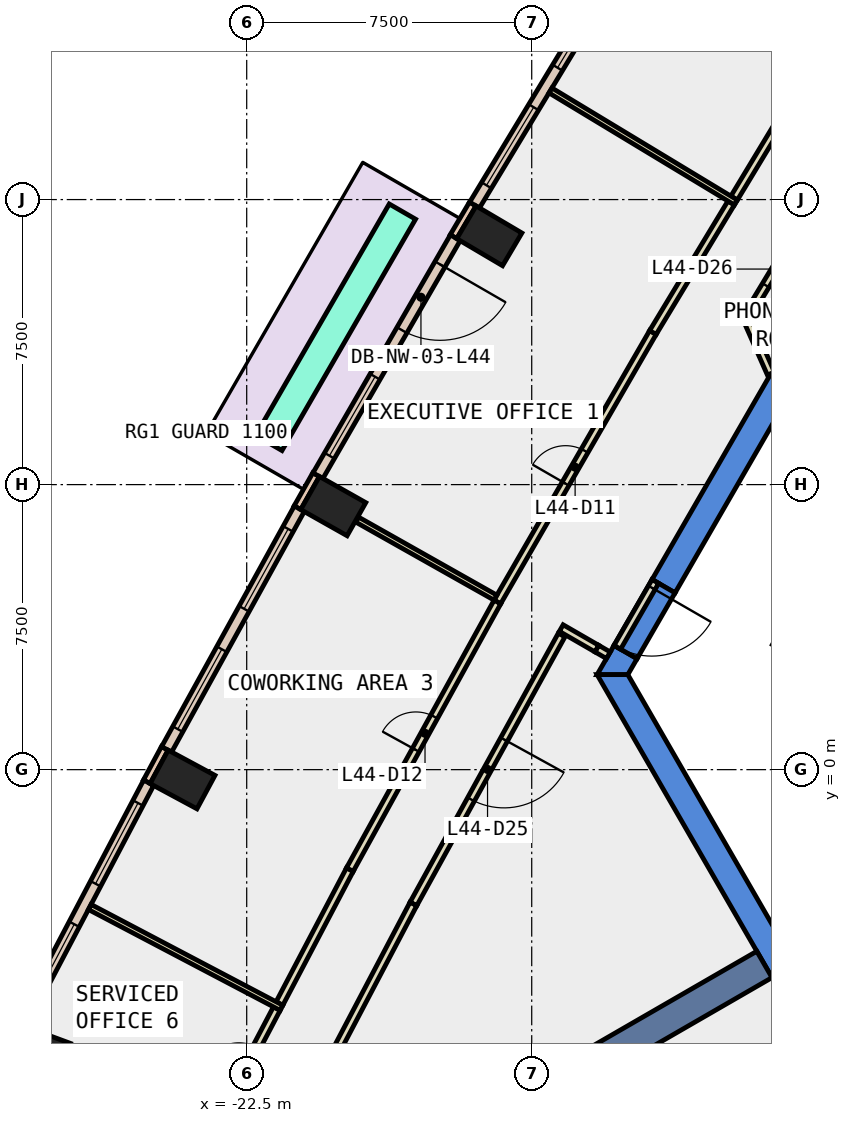
"""IFC4 building model, lengths in metres.
Left out: names, types, materials, properties, quantities, classifications, styles, units other than length and angle.
Written with IfcOpenShell. Run it as: python <this file> out.ifc"""

import sys

from ifc_helpers import new_model, si_unit, direction, frame, frame_2d, origin, origin_2d, place, context, subcontext, project, spatial, polyline, rectangle, outline, extrude, element, fill, save


model = new_model("IFC4")
c1 = context("Model", 3, precision=1e-05, world=origin(), true_north=direction((0.0, 1.0)))
c2 = subcontext(c1, "Body", "Model", "MODEL_VIEW")
j1 = project(units=[si_unit("LENGTHUNIT", "METRE"), si_unit("PLANEANGLEUNIT", "RADIAN")], contexts=[c1])
p1 = place(None, origin())
s1 = spatial("IfcSite", under=j1, at=p1, CompositionType="ELEMENT")
p2 = place(p1, origin())
s2 = spatial("IfcBuilding", under=s1, at=p2, CompositionType="ELEMENT")
p3 = place(p2, frame((0.0, 0.0, 198.2)))
s3 = spatial("IfcBuildingStorey", under=s2, at=p3, CompositionType="ELEMENT", Elevation=198.2)
for number, where, z_axis, x_axis in (
    (1, (-16.116, 14.046, -0.4), (0.0, 0.0, 1.0), (0.509, 0.861, 0.0)),
    (2, (-20.222, 6.934, -0.4), (0.0, 0.0, 1.0), (0.491, 0.871, 0.0)),
    (3, (-24.188, -0.259, -0.4), (0.0, 0.0, 1.0), (0.474, 0.88, 0.0)),
    (4, (-27.967, -7.429, -0.4), (0.0, 0.0, 1.0), (0.347, 0.938, 0.0)),
):
    element("IfcColumn", number, at=place(p3, frame(where, z_axis=z_axis, x_axis=x_axis)), inside=s3, PredefinedType="COLUMN", context=c2, shape_type="SweptSolid", body=[
        extrude(rectangle(XDim=1.0, YDim=1.4, at=origin_2d()), origin(), (0.0, 0.0, 1.0), 4.2),
    ])
p4 = place(p3, frame((0.0, 0.0, -0.4)))
e5 = element("IfcWall", 5, at=p4, inside=s3, PredefinedType="SHEAR", context=c2, shape_type="SweptSolid", body=[
    extrude(outline(polyline([(-11.834, 5.002), (-11.228, 4.652), (-6.235, 13.3), (-6.64, 14.0), (-11.834, 5.002)])), origin(), (0.0, 0.0, 1.0), 4.2),
])
p5 = place(p3, frame((0.0, 0.0, -0.4)))
e6 = element("IfcWall", 6, at=p5, inside=s3, PredefinedType="SHEAR", context=c2, shape_type="SweptSolid", body=[
    extrude(outline(polyline([(-12.228, 2.92), (-12.834, 3.27), (-13.279, 2.5), (-12.471, 2.5), (-12.228, 2.92)])), origin(), (0.0, 0.0, 1.0), 4.2),
])
p6 = place(p3, frame((0.0, 0.0, 3.6)))
e7 = element("IfcWall", 7, at=p6, inside=s3, PredefinedType="SHEAR", context=c2, shape_type="SweptSolid", body=[
    extrude(outline(polyline([(-12.834, 3.27), (-12.228, 2.92), (-11.228, 4.652), (-11.834, 5.002), (-12.834, 3.27)])), origin(), (0.0, 0.0, 1.0), 0.2),
])
p7 = place(p3, frame((0.0, 0.0, -0.4)))
e8 = element("IfcWall", 8, at=p7, inside=s3, PredefinedType="SHEAR", context=c2, shape_type="SweptSolid", body=[
    extrude(outline(polyline([(-13.279, 2.5), (-6.64, -9.0), (-6.235, -8.3), (-12.471, 2.5), (-13.279, 2.5)])), origin(), (0.0, 0.0, 1.0), 4.2),
])
p8 = place(p3, frame((-8.877, -5.125, -0.4), z_axis=(0.0, 0.0, 1.0), x_axis=(-0.866017533419, -0.500013631625, 0.0)))
e9 = element("IfcWall", 9, at=p8, inside=s3, PredefinedType="SHEAR", context=c2, shape_type="SweptSolid", body=[
    extrude(rectangle(XDim=9.0, YDim=0.8, at=frame_2d((4.5, 0.0))), origin(), (0.0, 0.0, 1.0), 4.2),
])
p9 = place(p3, frame((-16.551, 14.884, 0.0), z_axis=(0.0, 0.0, 1.0), x_axis=(-0.508161541526, -0.861261776531, 0.0)))
e10 = element("IfcWall", 10, at=p9, inside=s3, PredefinedType="STANDARD", context=c2, shape_type="SweptSolid", body=[
    extrude(rectangle(XDim=1.0, YDim=0.2, at=frame_2d((0.5, 0.0))), origin(), (0.0, 0.0, 1.0), 3.8),
])
p10 = place(p3, frame((-20.673, 7.762, 0.0), z_axis=(0.0, 0.0, 1.0), x_axis=(-0.491848119507, -0.870681013539, 0.0)))
e11 = element("IfcWall", 11, at=p10, inside=s3, PredefinedType="STANDARD", context=c2, shape_type="SweptSolid", body=[
    extrude(rectangle(XDim=1.0, YDim=0.2, at=frame_2d((0.5, 0.0))), origin(), (0.0, 0.0, 1.0), 3.8),
])
p11 = place(p3, frame((-24.655, 0.561, 0.0), z_axis=(0.0, 0.0, 1.0), x_axis=(-0.473663196434, -0.88070606694, 0.0)))
e12 = element("IfcWall", 12, at=p11, inside=s3, PredefinedType="STANDARD", context=c2, shape_type="SweptSolid", body=[
    extrude(rectangle(XDim=1.0, YDim=0.2, at=frame_2d((0.5, 0.0))), origin(), (0.0, 0.0, 1.0), 3.8),
])
p12 = place(p3, frame((-12.765, 21.043, 0.0), z_axis=(0.0, 0.0, 1.0), x_axis=(-0.517159962006, -0.855888762456, 0.0)))
e13 = element("IfcWall", 13, at=p12, inside=s3, PredefinedType="STANDARD", context=c2, shape_type="SweptSolid", body=[
    extrude(rectangle(XDim=7.23, YDim=0.3, at=frame_2d((3.615, 0.0))), origin(), (0.0, 0.0, 1.0), 3.8),
])
p13 = place(p12, frame((0.607, 0.0, 0.9)))
e14 = element("IfcOpeningElement", 14, at=p13, cuts=e13, PredefinedType="OPENING", context=c2, shape_type="SweptSolid", body=[
    extrude(rectangle(XDim=2.4, YDim=2.6, at=frame_2d((1.2, 1.3))), frame((0.0, 0.16, 0.0), z_axis=(0.0, -1.0, 0.0), x_axis=(1.0, 0.0, 0.0)), (0.0, 0.0, 1.0), 0.32),
])
p14 = place(p12, frame((4.222, 0.0, 0.9)))
e15 = element("IfcOpeningElement", 15, at=p14, cuts=e13, PredefinedType="OPENING", context=c2, shape_type="SweptSolid", body=[
    extrude(rectangle(XDim=2.4, YDim=2.6, at=frame_2d((1.2, 1.3))), frame((0.0, 0.16, 0.0), z_axis=(0.0, -1.0, 0.0), x_axis=(1.0, 0.0, 0.0)), (0.0, 0.0, 1.0), 0.32),
])
p15 = place(p3, frame((-17.011, 13.996, 0.0), z_axis=(0.0, 0.0, 1.0), x_axis=(-0.499948481376, -0.866055146033, 0.0)))
e16 = element("IfcWall", 16, at=p15, inside=s3, PredefinedType="STANDARD", context=c2, shape_type="SweptSolid", body=[
    extrude(rectangle(XDim=7.231, YDim=0.3, at=frame_2d((3.615, 0.0))), origin(), (0.0, 0.0, 1.0), 3.8),
])
p16 = place(p15, frame((0.808, 0.0, 0.0)))
e17 = element("IfcOpeningElement", 17, at=p16, cuts=e16, PredefinedType="OPENING", context=c2, shape_type="SweptSolid", body=[
    extrude(rectangle(XDim=2.0, YDim=2.4, at=frame_2d((1.0, 1.2))), frame((0.0, 0.16, 0.0), z_axis=(0.0, -1.0, 0.0), x_axis=(1.0, 0.0, 0.0)), (0.0, 0.0, 1.0), 0.32),
])
p17 = place(p15, frame((4.223, 0.0, 0.9)))
e18 = element("IfcOpeningElement", 18, at=p17, cuts=e16, PredefinedType="OPENING", context=c2, shape_type="SweptSolid", body=[
    extrude(rectangle(XDim=2.4, YDim=2.6, at=frame_2d((1.2, 1.3))), frame((0.0, 0.16, 0.0), z_axis=(0.0, -1.0, 0.0), x_axis=(1.0, 0.0, 0.0)), (0.0, 0.0, 1.0), 0.32),
])
p18 = place(p3, frame((-21.116, 6.865, 0.0), z_axis=(0.0, 0.0, 1.0), x_axis=(-0.482862185961, -0.875696356832, 0.0)))
e19 = element("IfcWall", 19, at=p18, inside=s3, PredefinedType="STANDARD", context=c2, shape_type="SweptSolid", body=[
    extrude(rectangle(XDim=7.23, YDim=0.3, at=frame_2d((3.615, 0.0))), origin(), (0.0, 0.0, 1.0), 3.8),
])
p19 = place(p18, frame((0.607, 0.0, 0.9)))
e20 = element("IfcOpeningElement", 20, at=p19, cuts=e19, PredefinedType="OPENING", context=c2, shape_type="SweptSolid", body=[
    extrude(rectangle(XDim=2.4, YDim=2.6, at=frame_2d((1.2, 1.3))), frame((0.0, 0.16, 0.0), z_axis=(0.0, -1.0, 0.0), x_axis=(1.0, 0.0, 0.0)), (0.0, 0.0, 1.0), 0.32),
])
p20 = place(p18, frame((4.222, 0.0, 0.9)))
e21 = element("IfcOpeningElement", 21, at=p20, cuts=e19, PredefinedType="OPENING", context=c2, shape_type="SweptSolid", body=[
    extrude(rectangle(XDim=2.4, YDim=2.6, at=frame_2d((1.2, 1.3))), frame((0.0, 0.16, 0.0), z_axis=(0.0, -1.0, 0.0), x_axis=(1.0, 0.0, 0.0)), (0.0, 0.0, 1.0), 0.32),
])
p21 = place(p3, frame((-25.08, -0.345, 0.0), z_axis=(0.0, 0.0, 1.0), x_axis=(-0.465478369088, -0.885059256723, 0.0)))
e22 = element("IfcWall", 22, at=p21, inside=s3, PredefinedType="STANDARD", context=c2, shape_type="SweptSolid", body=[
    extrude(rectangle(XDim=7.208, YDim=0.3, at=frame_2d((3.604, 0.0))), origin(), (0.0, 0.0, 1.0), 3.8),
])
p22 = place(p21, frame((0.602, 0.0, 0.9)))
e23 = element("IfcOpeningElement", 23, at=p22, cuts=e22, PredefinedType="OPENING", context=c2, shape_type="SweptSolid", body=[
    extrude(rectangle(XDim=2.4, YDim=2.6, at=frame_2d((1.2, 1.3))), frame((0.0, 0.16, 0.0), z_axis=(0.0, -1.0, 0.0), x_axis=(1.0, 0.0, 0.0)), (0.0, 0.0, 1.0), 0.32),
])
p23 = place(p21, frame((4.206, 0.0, 0.9)))
e24 = element("IfcOpeningElement", 24, at=p23, cuts=e22, PredefinedType="OPENING", context=c2, shape_type="SweptSolid", body=[
    extrude(rectangle(XDim=2.4, YDim=2.6, at=frame_2d((1.2, 1.3))), frame((0.0, 0.16, 0.0), z_axis=(0.0, -1.0, 0.0), x_axis=(1.0, 0.0, 0.0)), (0.0, 0.0, 1.0), 0.32),
])
p24 = place(p3, frame((-18.403, 14.684, 0.0), z_axis=(0.0, 0.0, 1.0), x_axis=(-0.499990006866, -0.866031173246, 0.0)))
e25 = element("IfcWall", 25, at=p24, inside=s3, PredefinedType="STANDARD", context=c2, shape_type="SweptSolid", body=[
    extrude(rectangle(XDim=7.03, YDim=0.8, at=frame_2d((3.515, 0.0))), origin(), (0.0, 0.0, 1.0), 0.8),
])
p25 = place(p3, frame((-7.759, 14.536, 0.0), z_axis=(0.0, 0.0, 1.0), x_axis=(-0.516926279395, -0.856029918678, 0.0)))
e26 = element("IfcWall", 26, at=p25, inside=s3, PredefinedType="PARTITIONING", context=c2, shape_type="SweptSolid", body=[
    extrude(rectangle(XDim=3.188, YDim=0.2, at=frame_2d((1.594, 0.0))), origin(), (0.0, 0.0, 1.0), 3.8),
])
p26 = place(p25, frame((1.094, 0.0, 0.0)))
e27 = element("IfcOpeningElement", 27, at=p26, cuts=e26, PredefinedType="OPENING", context=c2, shape_type="SweptSolid", body=[
    extrude(rectangle(XDim=1.0, YDim=2.1, at=frame_2d((0.5, 1.05))), frame((0.0, 0.11, 0.0), z_axis=(0.0, -1.0, 0.0), x_axis=(1.0, 0.0, 0.0)), (0.0, 0.0, 1.0), 0.22),
])
p27 = place(p3, frame((-9.315, 11.801, 0.0), z_axis=(0.0, 0.0, 1.0), x_axis=(0.403943240321, -0.914784050254, 0.0)))
e28 = element("IfcWall", 28, at=p27, inside=s3, PredefinedType="PARTITIONING", context=c2, shape_type="SweptSolid", body=[
    extrude(rectangle(XDim=1.507, YDim=0.2, at=frame_2d((0.754, 0.0))), origin(), (0.0, 0.0, 1.0), 3.8),
])
p28 = place(p3, frame((-18.112, -3.531, 0.0), z_axis=(0.0, 0.0, 1.0), x_axis=(-0.465461327558, -0.885068219149, 0.0)))
e29 = element("IfcWall", 29, at=p28, inside=s3, PredefinedType="PARTITIONING", context=c2, shape_type="SweptSolid", body=[
    extrude(rectangle(XDim=7.236, YDim=0.2, at=frame_2d((3.618, 0.0))), origin(), (0.0, 0.0, 1.0), 3.8),
])
p29 = place(p3, frame((-12.984, 3.01, 0.0), z_axis=(0.0, 0.0, 1.0), x_axis=(-0.866046247233, 0.49996389635, 0.0)))
e30 = element("IfcWall", 30, at=p29, inside=s3, PredefinedType="PARTITIONING", context=c2, shape_type="SweptSolid", body=[
    extrude(rectangle(XDim=0.35, YDim=0.2, at=frame_2d((0.175, 0.0))), origin(), (0.0, 0.0, 1.0), 2.4),
])
p30 = place(p3, frame((-14.213, 3.543, 0.0), z_axis=(0.0, 0.0, 1.0), x_axis=(-0.482724934882, -0.875772023556, 0.0)))
e31 = element("IfcWall", 31, at=p30, inside=s3, PredefinedType="PARTITIONING", context=c2, shape_type="SweptSolid", body=[
    extrude(rectangle(XDim=8.077, YDim=0.2, at=frame_2d((4.039, 0.0))), origin(), (0.0, 0.0, 1.0), 3.8),
])
p31 = place(p30, frame((3.139, 0.0, 0.0)))
e32 = element("IfcOpeningElement", 32, at=p31, cuts=e31, PredefinedType="OPENING", context=c2, shape_type="SweptSolid", body=[
    extrude(rectangle(XDim=1.8, YDim=2.1, at=frame_2d((0.9, 1.05))), frame((0.0, 0.11, 0.0), z_axis=(0.0, -1.0, 0.0), x_axis=(1.0, 0.0, 0.0)), (0.0, 0.0, 1.0), 0.22),
])
p32 = place(p3, frame((-9.674, 15.039, 0.0), z_axis=(0.0, 0.0, 1.0), x_axis=(0.516918251554, 0.856034766356, 0.0)))
e33 = element("IfcWall", 33, at=p32, inside=s3, PredefinedType="PARTITIONING", context=c2, shape_type="SweptSolid", body=[
    extrude(rectangle(XDim=3.983, YDim=0.2, at=frame_2d((1.992, 0.0))), origin(), (0.0, 0.0, 1.0), 3.8),
])
p33 = place(p3, frame((-15.905, 4.412, 0.0), z_axis=(0.0, 0.0, 1.0), x_axis=(0.5000098125, 0.866019738461, 0.0)))
e34 = element("IfcWall", 34, at=p33, inside=s3, PredefinedType="PARTITIONING", context=c2, shape_type="SweptSolid", body=[
    extrude(rectangle(XDim=8.188, YDim=0.2, at=frame_2d((4.094, 0.0))), origin(), (0.0, 0.0, 1.0), 3.8),
])
p34 = place(p33, frame((3.594, 0.0, 0.0)))
e35 = element("IfcOpeningElement", 35, at=p34, cuts=e34, PredefinedType="OPENING", context=c2, shape_type="SweptSolid", body=[
    extrude(rectangle(XDim=1.0, YDim=2.1, at=frame_2d((0.5, 1.05))), frame((0.0, 0.11, 0.0), z_axis=(0.0, -1.0, 0.0), x_axis=(1.0, 0.0, 0.0)), (0.0, 0.0, 1.0), 0.22),
])
for number, where, z_axis, x_axis in (
    (36, (-11.811, 11.503, 0.0), (0.0, 0.0, 1.0), (0.517, 0.856, 0.0)),
    (37, (-21.638, -6.154, 0.0), (0.0, 0.0, 1.0), (0.465, 0.885, 0.0)),
):
    element("IfcWall", number, at=place(p3, frame(where, z_axis=z_axis, x_axis=x_axis)), inside=s3, PredefinedType="PARTITIONING", context=c2, shape_type="SweptSolid", body=[
        extrude(rectangle(XDim=3.982, YDim=0.2, at=frame_2d((1.991, 0.0))), origin(), (0.0, 0.0, 1.0), 3.8),
    ])
p35 = place(p3, frame((-19.785, -2.63, 0.0), z_axis=(0.0, 0.0, 1.0), x_axis=(0.482817232578, 0.875721142788, 0.0)))
e38 = element("IfcWall", 38, at=p35, inside=s3, PredefinedType="PARTITIONING", context=c2, shape_type="SweptSolid", body=[
    extrude(rectangle(XDim=8.04, YDim=0.2, at=frame_2d((4.02, 0.0))), origin(), (0.0, 0.0, 1.0), 3.8),
])
p36 = place(p35, frame((3.595, 0.0, 0.0)))
e39 = element("IfcOpeningElement", 39, at=p36, cuts=e38, PredefinedType="OPENING", context=c2, shape_type="SweptSolid", body=[
    extrude(rectangle(XDim=1.0, YDim=2.1, at=frame_2d((0.5, 1.05))), frame((0.0, 0.11, 0.0), z_axis=(0.0, -1.0, 0.0), x_axis=(1.0, 0.0, 0.0)), (0.0, 0.0, 1.0), 0.22),
])
p37 = place(p3, frame((-23.242, -9.204, 0.0), z_axis=(0.0, 0.0, 1.0), x_axis=(0.465431933571, 0.885083676955, 0.0)))
e40 = element("IfcWall", 40, at=p37, inside=s3, PredefinedType="PARTITIONING", context=c2, shape_type="SweptSolid", body=[
    extrude(rectangle(XDim=3.296, YDim=0.2, at=frame_2d((1.648, 0.0))), origin(), (0.0, 0.0, 1.0), 3.8),
])
p38 = place(p37, frame((1.148, 0.0, 0.0)))
e41 = element("IfcOpeningElement", 41, at=p38, cuts=e40, PredefinedType="OPENING", context=c2, shape_type="SweptSolid", body=[
    extrude(rectangle(XDim=1.0, YDim=2.1, at=frame_2d((0.5, 1.05))), frame((0.0, 0.11, 0.0), z_axis=(0.0, -1.0, 0.0), x_axis=(1.0, 0.0, 0.0)), (0.0, 0.0, 1.0), 0.22),
])
p39 = place(p3, frame((-9.628, 14.924, 0.0), z_axis=(0.0, 0.0, 1.0), x_axis=(-0.855931736607, 0.517088834021, 0.0)))
e42 = element("IfcWall", 42, at=p39, inside=s3, PredefinedType="PARTITIONING", context=c2, shape_type="SweptSolid", body=[
    extrude(rectangle(XDim=5.699, YDim=0.15, at=frame_2d((2.85, 0.0))), origin(), (0.0, 0.0, 1.0), 3.8),
])
p40 = place(p3, frame((-15.954, 4.526, 0.0), z_axis=(0.0, 0.0, 1.0), x_axis=(-0.870940016277, 0.491389344663, 0.0)))
e43 = element("IfcWall", 43, at=p40, inside=s3, PredefinedType="PARTITIONING", context=c2, shape_type="SweptSolid", body=[
    extrude(rectangle(XDim=4.18, YDim=0.15, at=frame_2d((2.09, 0.0))), origin(), (0.0, 0.0, 1.0), 3.8),
])
p41 = place(p3, frame((-21.585, -6.267, 0.0), z_axis=(0.0, 0.0, 1.0), x_axis=(-0.885073333504, 0.465451602554, 0.0)))
e44 = element("IfcWall", 44, at=p41, inside=s3, PredefinedType="PARTITIONING", context=c2, shape_type="SweptSolid", body=[
    extrude(rectangle(XDim=5.7, YDim=0.15, at=frame_2d((2.85, 0.0))), origin(), (0.0, 0.0, 1.0), 3.8),
])
p42 = place(p3, frame((-11.747, 4.952, 0.0), z_axis=(0.0, 0.0, 1.0), x_axis=(-0.50002537861, -0.866010750942, 0.0)))
e45 = element("IfcWall", 45, at=p42, inside=s3, PredefinedType="PARTITIONING", context=c2, shape_type="SweptSolid", body=[
    extrude(rectangle(XDim=2.0, YDim=0.2, at=frame_2d((1.0, 0.0))), origin(), (0.0, 0.0, 1.0), 2.4),
])
p43 = place(p42, frame((0.19, 0.0, 0.0)))
e46 = element("IfcOpeningElement", 46, at=p43, cuts=e45, PredefinedType="OPENING", context=c2, shape_type="SweptSolid", body=[
    extrude(rectangle(XDim=1.8, YDim=2.1, at=frame_2d((0.9, 1.05))), frame((0.0, 0.11, 0.0), z_axis=(0.0, -1.0, 0.0), x_axis=(1.0, 0.0, 0.0)), (0.0, 0.0, 1.0), 0.22),
])
p44 = place(p3, frame((-13.287, 3.185, 0.0), z_axis=(0.0, 0.0, 1.0), x_axis=(-0.866121626761, 0.499833299868, 0.0)))
e47 = element("IfcWall", 47, at=p44, inside=s3, PredefinedType="PARTITIONING", context=c2, shape_type="SweptSolid", body=[
    extrude(rectangle(XDim=1.08, YDim=0.2, at=frame_2d((0.54, 0.0))), origin(), (0.0, 0.0, 1.0), 3.8),
])
p45 = place(p13, origin())
e48 = element("IfcWindow", 48, at=p45, inside=s3, PartitioningType="SINGLE_PANEL", PredefinedType="WINDOW", context=c2, shape_type="SweptSolid", body=[
    extrude(rectangle(XDim=2.4, YDim=2.6, at=frame_2d((1.2, 1.3))), frame((0.0, 0.03, 0.0), z_axis=(0.0, -1.0, 0.0), x_axis=(1.0, 0.0, 0.0)), (0.0, 0.0, 1.0), 0.06),
])
fill(e14, e48)
p46 = place(p14, origin())
e49 = element("IfcWindow", 49, at=p46, inside=s3, PartitioningType="SINGLE_PANEL", PredefinedType="WINDOW", context=c2, shape_type="SweptSolid", body=[
    extrude(rectangle(XDim=2.4, YDim=2.6, at=frame_2d((1.2, 1.3))), frame((0.0, 0.03, 0.0), z_axis=(0.0, -1.0, 0.0), x_axis=(1.0, 0.0, 0.0)), (0.0, 0.0, 1.0), 0.06),
])
fill(e15, e49)
p47 = place(p16, origin())
e50 = element("IfcDoor", 50, at=p47, inside=s3, OperationType="SLIDING_TO_LEFT", PredefinedType="DOOR", context=c2, shape_type="SweptSolid", body=[
    extrude(rectangle(XDim=2.0, YDim=2.4, at=frame_2d((1.0, 1.2))), frame((0.0, 0.025, 0.0), z_axis=(0.0, -1.0, 0.0), x_axis=(1.0, 0.0, 0.0)), (0.0, 0.0, 1.0), 0.05),
])
fill(e17, e50)
p48 = place(p17, origin())
e51 = element("IfcWindow", 51, at=p48, inside=s3, PartitioningType="SINGLE_PANEL", PredefinedType="WINDOW", context=c2, shape_type="SweptSolid", body=[
    extrude(rectangle(XDim=2.4, YDim=2.6, at=frame_2d((1.2, 1.3))), frame((0.0, 0.03, 0.0), z_axis=(0.0, -1.0, 0.0), x_axis=(1.0, 0.0, 0.0)), (0.0, 0.0, 1.0), 0.06),
])
fill(e18, e51)
p49 = place(p19, origin())
e52 = element("IfcWindow", 52, at=p49, inside=s3, PartitioningType="SINGLE_PANEL", PredefinedType="WINDOW", context=c2, shape_type="SweptSolid", body=[
    extrude(rectangle(XDim=2.4, YDim=2.6, at=frame_2d((1.2, 1.3))), frame((0.0, 0.03, 0.0), z_axis=(0.0, -1.0, 0.0), x_axis=(1.0, 0.0, 0.0)), (0.0, 0.0, 1.0), 0.06),
])
fill(e20, e52)
p50 = place(p20, origin())
e53 = element("IfcWindow", 53, at=p50, inside=s3, PartitioningType="SINGLE_PANEL", PredefinedType="WINDOW", context=c2, shape_type="SweptSolid", body=[
    extrude(rectangle(XDim=2.4, YDim=2.6, at=frame_2d((1.2, 1.3))), frame((0.0, 0.03, 0.0), z_axis=(0.0, -1.0, 0.0), x_axis=(1.0, 0.0, 0.0)), (0.0, 0.0, 1.0), 0.06),
])
fill(e21, e53)
p51 = place(p22, origin())
e54 = element("IfcWindow", 54, at=p51, inside=s3, PartitioningType="SINGLE_PANEL", PredefinedType="WINDOW", context=c2, shape_type="SweptSolid", body=[
    extrude(rectangle(XDim=2.4, YDim=2.6, at=frame_2d((1.2, 1.3))), frame((0.0, 0.03, 0.0), z_axis=(0.0, -1.0, 0.0), x_axis=(1.0, 0.0, 0.0)), (0.0, 0.0, 1.0), 0.06),
])
fill(e23, e54)
p52 = place(p23, origin())
e55 = element("IfcWindow", 55, at=p52, inside=s3, PartitioningType="SINGLE_PANEL", PredefinedType="WINDOW", context=c2, shape_type="SweptSolid", body=[
    extrude(rectangle(XDim=2.4, YDim=2.6, at=frame_2d((1.2, 1.3))), frame((0.0, 0.03, 0.0), z_axis=(0.0, -1.0, 0.0), x_axis=(1.0, 0.0, 0.0)), (0.0, 0.0, 1.0), 0.06),
])
fill(e24, e55)
p53 = place(p34, origin())
e56 = element("IfcDoor", 56, at=p53, inside=s3, OperationType="SINGLE_SWING_LEFT", PredefinedType="DOOR", context=c2, shape_type="SweptSolid", body=[
    extrude(rectangle(XDim=1.0, YDim=2.1, at=frame_2d((0.5, 1.05))), frame((0.0, 0.025, 0.0), z_axis=(0.0, -1.0, 0.0), x_axis=(1.0, 0.0, 0.0)), (0.0, 0.0, 1.0), 0.05),
])
fill(e35, e56)
p54 = place(p36, origin())
e57 = element("IfcDoor", 57, at=p54, inside=s3, OperationType="SINGLE_SWING_LEFT", PredefinedType="DOOR", context=c2, shape_type="SweptSolid", body=[
    extrude(rectangle(XDim=1.0, YDim=2.1, at=frame_2d((0.5, 1.05))), frame((0.0, 0.025, 0.0), z_axis=(0.0, -1.0, 0.0), x_axis=(1.0, 0.0, 0.0)), (0.0, 0.0, 1.0), 0.05),
])
fill(e39, e57)
p55 = place(p31, origin())
e58 = element("IfcDoor", 58, at=p55, inside=s3, OperationType="DOUBLE_DOOR_SINGLE_SWING", PredefinedType="DOOR", context=c2, shape_type="SweptSolid", body=[
    extrude(rectangle(XDim=1.8, YDim=2.1, at=frame_2d((0.9, 1.05))), frame((0.0, 0.025, 0.0), z_axis=(0.0, -1.0, 0.0), x_axis=(1.0, 0.0, 0.0)), (0.0, 0.0, 1.0), 0.05),
])
fill(e32, e58)
p56 = place(p26, origin())
e59 = element("IfcDoor", 59, at=p56, inside=s3, OperationType="SINGLE_SWING_LEFT", PredefinedType="DOOR", context=c2, shape_type="SweptSolid", body=[
    extrude(rectangle(XDim=1.0, YDim=2.1, at=frame_2d((0.5, 1.05))), frame((0.0, 0.025, 0.0), z_axis=(0.0, -1.0, 0.0), x_axis=(1.0, 0.0, 0.0)), (0.0, 0.0, 1.0), 0.05),
])
fill(e27, e59)
p57 = place(p43, origin())
e60 = element("IfcDoor", 60, at=p57, inside=s3, OperationType="DOUBLE_DOOR_SINGLE_SWING", PredefinedType="DOOR", context=c2, shape_type="SweptSolid", body=[
    extrude(rectangle(XDim=1.8, YDim=2.1, at=frame_2d((0.9, 1.05))), frame((0.0, 0.025, 0.0), z_axis=(0.0, -1.0, 0.0), x_axis=(1.0, 0.0, 0.0)), (0.0, 0.0, 1.0), 0.05),
])
fill(e46, e60)
save(model, sys.argv[1])
